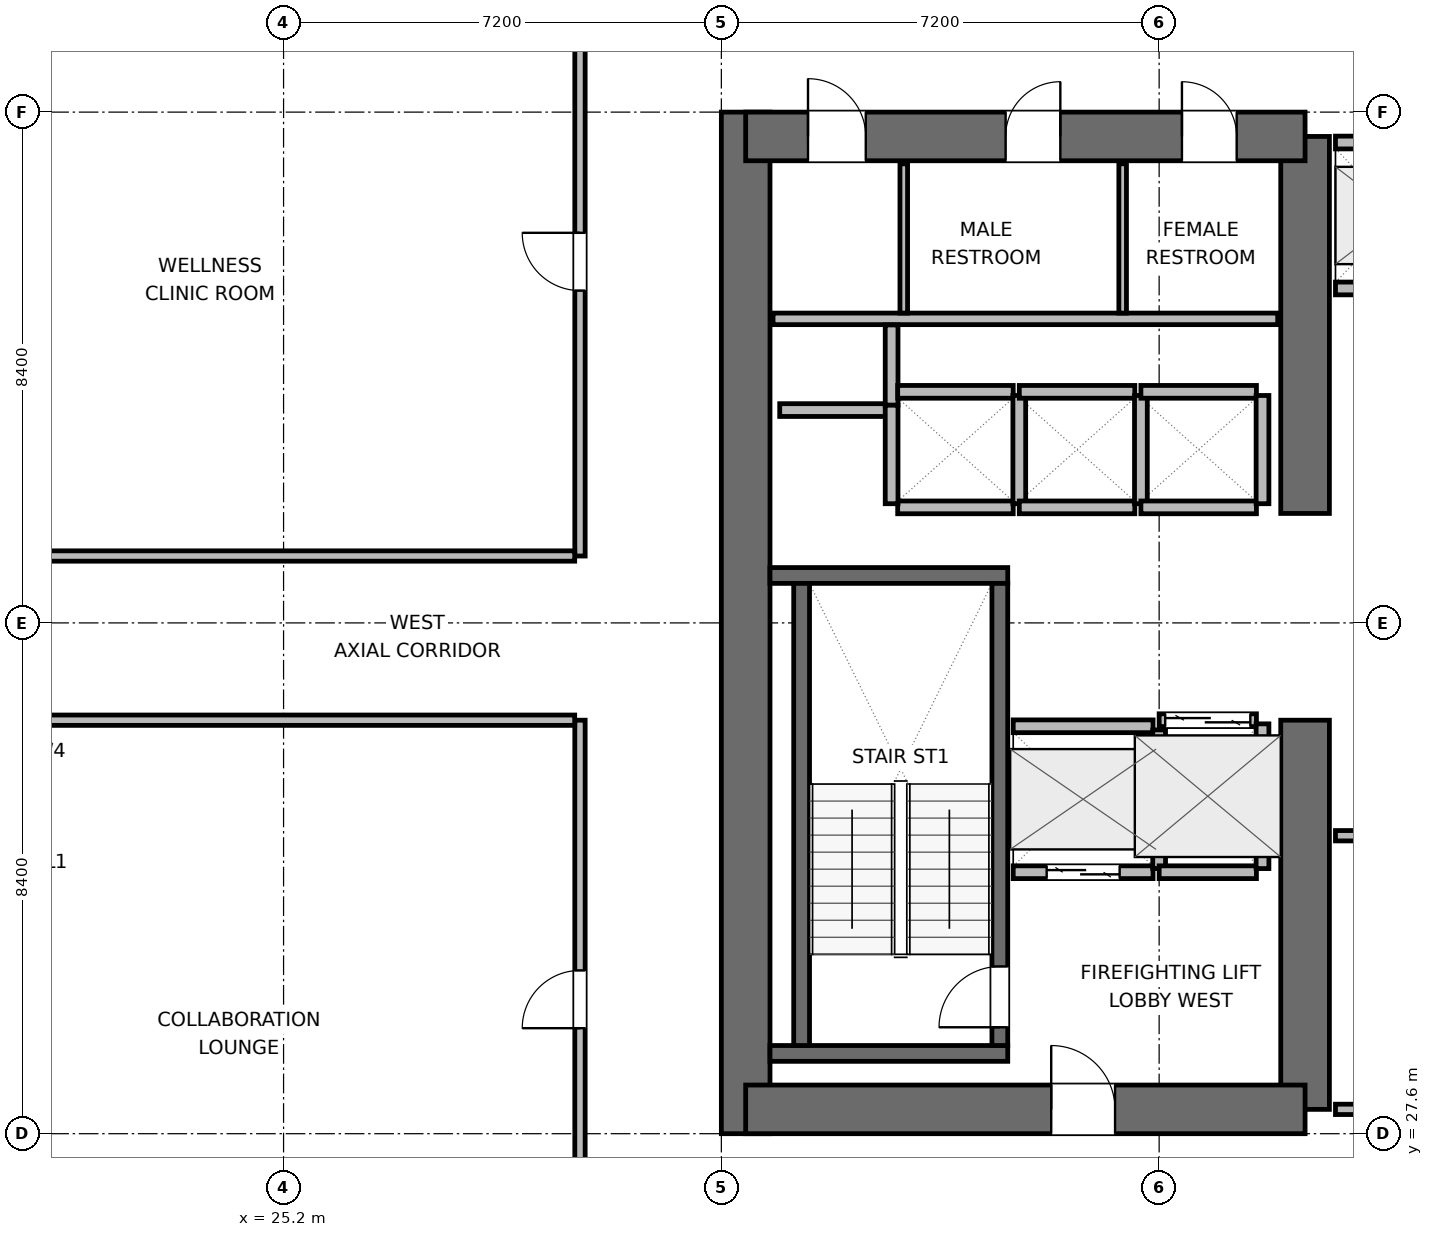
"""IFC4 building model, lengths in metres.
Left out: names, types, materials, properties, quantities, classifications, styles, units other than length and angle.
Written with IfcOpenShell. Run it as: python <this file> out.ifc"""

import sys

from ifc_helpers import new_model, si_unit, direction, frame, frame_2d, origin, place, context, subcontext, project, spatial, rectangle, extrude, element, fill, save


model = new_model("IFC4")
c1 = context("Model", 3, precision=1e-05, world=origin(), true_north=direction((0.0, 1.0)))
c2 = subcontext(c1, "Body", "Model", "MODEL_VIEW")
j1 = project(units=[si_unit("LENGTHUNIT", "METRE"), si_unit("PLANEANGLEUNIT", "RADIAN")], contexts=[c1])
p1 = place(None, origin())
s1 = spatial("IfcSite", under=j1, at=p1, CompositionType="ELEMENT")
p2 = place(p1, origin())
s2 = spatial("IfcBuilding", under=s1, at=p2, CompositionType="ELEMENT")
p3 = place(p2, frame((0.0, 0.0, 158.4)))
s3 = spatial("IfcBuildingStorey", under=s2, at=p3, CompositionType="ELEMENT", Elevation=158.4)
p4 = place(p3, frame((32.8, 27.6, 0.0), z_axis=(0.0, 0.0, 1.0), x_axis=(0.0, 1.0, 0.0)))
e1 = element("IfcWall", 1, at=p4, inside=s3, PredefinedType="SHEAR", context=c2, shape_type="SweptSolid", body=[
    extrude(rectangle(XDim=16.8, YDim=0.8, at=frame_2d((8.4, 0.0))), origin(), (0.0, 0.0, 1.0), 3.9),
])
p5 = place(p3, frame((42.0, 28.0, 0.0), z_axis=(0.0, 0.0, 1.0), x_axis=(0.0, 1.0, 0.0)))
e2 = element("IfcWall", 2, at=p5, inside=s3, PredefinedType="SHEAR", context=c2, shape_type="SweptSolid", body=[
    extrude(rectangle(XDim=6.4, YDim=0.8, at=frame_2d((3.2, 0.0))), origin(), (0.0, 0.0, 1.0), 3.9),
])
p6 = place(p3, frame((42.0, 37.8, 0.0), z_axis=(0.0, 0.0, 1.0), x_axis=(0.0, 1.0, 0.0)))
e3 = element("IfcWall", 3, at=p6, inside=s3, PredefinedType="SHEAR", context=c2, shape_type="SweptSolid", body=[
    extrude(rectangle(XDim=6.2, YDim=0.8, at=frame_2d((3.1, 0.0))), origin(), (0.0, 0.0, 1.0), 3.9),
])
p7 = place(p3, frame((32.8, 28.0, 0.0), z_axis=(0.0, 0.0, 1.0), x_axis=(1.0, 0.0, 0.0)))
e4 = element("IfcWall", 4, at=p7, inside=s3, PredefinedType="SHEAR", context=c2, shape_type="SweptSolid", body=[
    extrude(rectangle(XDim=9.2, YDim=0.8, at=frame_2d((4.6, 0.0))), origin(), (0.0, 0.0, 1.0), 3.9),
])
p8 = place(p7, frame((5.025, 0.0, 0.0)))
e5 = element("IfcOpeningElement", 5, at=p8, cuts=e4, PredefinedType="OPENING", context=c2, shape_type="SweptSolid", body=[
    extrude(rectangle(XDim=1.05, YDim=2.04, at=frame_2d((0.525, 1.02))), frame((0.0, 0.41, 0.0), z_axis=(0.0, -1.0, 0.0), x_axis=(1.0, 0.0, 0.0)), (0.0, 0.0, 1.0), 0.82),
])
p9 = place(p3, frame((32.8, 44.0, 0.0), z_axis=(0.0, 0.0, 1.0), x_axis=(1.0, 0.0, 0.0)))
e6 = element("IfcWall", 6, at=p9, inside=s3, PredefinedType="SHEAR", context=c2, shape_type="SweptSolid", body=[
    extrude(rectangle(XDim=9.2, YDim=0.8, at=frame_2d((4.6, 0.0))), origin(), (0.0, 0.0, 1.0), 3.9),
])
p10 = place(p9, frame((1.025, 0.0, 0.0)))
e7 = element("IfcOpeningElement", 7, at=p10, cuts=e6, PredefinedType="OPENING", context=c2, shape_type="SweptSolid", body=[
    extrude(rectangle(XDim=0.95, YDim=2.04, at=frame_2d((0.475, 1.02))), frame((0.0, 0.41, 0.0), z_axis=(0.0, -1.0, 0.0), x_axis=(1.0, 0.0, 0.0)), (0.0, 0.0, 1.0), 0.82),
])
p11 = place(p9, frame((4.275, 0.0, 0.0)))
e8 = element("IfcOpeningElement", 8, at=p11, cuts=e6, PredefinedType="OPENING", context=c2, shape_type="SweptSolid", body=[
    extrude(rectangle(XDim=0.9, YDim=2.02, at=frame_2d((0.45, 1.01))), frame((0.0, 0.41, 0.0), z_axis=(0.0, -1.0, 0.0), x_axis=(1.0, 0.0, 0.0)), (0.0, 0.0, 1.0), 0.82),
])
p12 = place(p9, frame((7.175, 0.0, 0.0)))
e9 = element("IfcOpeningElement", 9, at=p12, cuts=e6, PredefinedType="OPENING", context=c2, shape_type="SweptSolid", body=[
    extrude(rectangle(XDim=0.9, YDim=2.02, at=frame_2d((0.45, 1.01))), frame((0.0, 0.41, 0.0), z_axis=(0.0, -1.0, 0.0), x_axis=(1.0, 0.0, 0.0)), (0.0, 0.0, 1.0), 0.82),
])
for number, where, z_axis, x_axis in (
    (10, (33.2, 28.92, 0.0), (0.0, 0.0, 1.0), (1.0, 0.0, 0.0)),
    (11, (33.2, 36.78, 0.0), (0.0, 0.0, 1.0), (1.0, 0.0, 0.0)),
):
    element("IfcWall", number, at=place(p3, frame(where, z_axis=z_axis, x_axis=x_axis)), inside=s3, PredefinedType="SHEAR", context=c2, shape_type="SweptSolid", body=[
        extrude(rectangle(XDim=3.91, YDim=0.26, at=frame_2d((1.955, 0.0))), origin(), (0.0, 0.0, 1.0), 3.9),
    ])
p13 = place(p3, frame((33.72, 29.05, 0.0), z_axis=(0.0, 0.0, 1.0), x_axis=(0.0, 1.0, 0.0)))
e12 = element("IfcWall", 12, at=p13, inside=s3, PredefinedType="SHEAR", context=c2, shape_type="SweptSolid", body=[
    extrude(rectangle(XDim=7.6, YDim=0.26, at=frame_2d((3.8, 0.0))), origin(), (0.0, 0.0, 1.0), 3.9),
])
p14 = place(p3, frame((36.98, 29.05, 0.0), z_axis=(0.0, 0.0, 1.0), x_axis=(0.0, 1.0, 0.0)))
e13 = element("IfcWall", 13, at=p14, inside=s3, PredefinedType="SHEAR", context=c2, shape_type="SweptSolid", body=[
    extrude(rectangle(XDim=7.6, YDim=0.26, at=frame_2d((3.8, 0.0))), origin(), (0.0, 0.0, 1.0), 3.9),
])
p15 = place(p14, frame((0.3, 0.0, 0.0)))
e14 = element("IfcOpeningElement", 14, at=p15, cuts=e13, PredefinedType="OPENING", context=c2, shape_type="SweptSolid", body=[
    extrude(rectangle(XDim=1.0, YDim=2.04, at=frame_2d((0.5, 1.02))), frame((0.0, 0.14, 0.0), z_axis=(0.0, -1.0, 0.0), x_axis=(1.0, 0.0, 0.0)), (0.0, 0.0, 1.0), 0.28),
])
p16 = place(p3, frame((33.25, 41.0, 0.0), z_axis=(0.0, 0.0, 1.0), x_axis=(1.0, 0.0, 0.0)))
e15 = element("IfcWall", 15, at=p16, inside=s3, PredefinedType="PLUMBINGWALL", context=c2, shape_type="SweptSolid", body=[
    extrude(rectangle(XDim=8.3, YDim=0.19, at=frame_2d((4.15, 0.0))), origin(), (0.0, 0.0, 1.0), 3.68),
])
for number, where, z_axis, x_axis in (
    (16, (35.4, 41.095, 0.0), (0.0, 0.0, 1.0), (0.0, 1.0, 0.0)),
    (17, (39.0, 41.095, 0.0), (0.0, 0.0, 1.0), (0.0, 1.0, 0.0)),
):
    element("IfcWall", number, at=place(p3, frame(where, z_axis=z_axis, x_axis=x_axis)), inside=s3, PredefinedType="PARTITIONING", context=c2, shape_type="SweptSolid", body=[
        extrude(rectangle(XDim=2.455, YDim=0.125, at=frame_2d((1.228, 0.0))), origin(), (0.0, 0.0, 1.0), 3.68),
    ])
p17 = place(p3, frame((33.36, 39.5, 0.0), z_axis=(0.0, 0.0, 1.0), x_axis=(1.0, 0.0, 0.0)))
e18 = element("IfcWall", 18, at=p17, inside=s3, PredefinedType="PARTITIONING", context=c2, shape_type="SweptSolid", body=[
    extrude(rectangle(XDim=1.86, YDim=0.21, at=frame_2d((0.93, 0.0))), origin(), (0.0, 0.0, 1.0), 3.68),
])
p18 = place(p3, frame((35.2, 39.58, 0.0), z_axis=(0.0, 0.0, 1.0), x_axis=(0.0, 1.0, 0.0)))
e19 = element("IfcWall", 19, at=p18, inside=s3, PredefinedType="PARTITIONING", context=c2, shape_type="SweptSolid", body=[
    extrude(rectangle(XDim=1.32, YDim=0.21, at=frame_2d((0.66, 0.0))), origin(), (0.0, 0.0, 1.0), 3.68),
])
p19 = place(p3, frame((37.2, 31.9, 0.0), z_axis=(0.0, 0.0, 1.0), x_axis=(1.0, 0.0, 0.0)))
e20 = element("IfcWall", 20, at=p19, inside=s3, PredefinedType="PARTITIONING", context=c2, shape_type="SweptSolid", body=[
    extrude(rectangle(XDim=2.3, YDim=0.21, at=frame_2d((1.15, 0.0))), origin(), (0.0, 0.0, 1.0), 3.68),
])
p20 = place(p19, frame((0.55, 0.0, 0.0)))
e21 = element("IfcOpeningElement", 21, at=p20, cuts=e20, PredefinedType="OPENING", context=c2, shape_type="SweptSolid", body=[
    extrude(rectangle(XDim=1.2, YDim=2.04, at=frame_2d((0.6, 1.02))), frame((0.0, 0.115, 0.0), z_axis=(0.0, -1.0, 0.0), x_axis=(1.0, 0.0, 0.0)), (0.0, 0.0, 1.0), 0.23),
])
p21 = place(p3, frame((37.2, 34.3, 0.0), z_axis=(0.0, 0.0, 1.0), x_axis=(1.0, 0.0, 0.0)))
e22 = element("IfcWall", 22, at=p21, inside=s3, PredefinedType="PARTITIONING", context=c2, shape_type="SweptSolid", body=[
    extrude(rectangle(XDim=2.3, YDim=0.21, at=frame_2d((1.15, 0.0))), origin(), (0.0, 0.0, 1.0), 3.68),
])
p22 = place(p3, frame((39.6, 31.96, 0.0), z_axis=(0.0, 0.0, 1.0), x_axis=(0.0, 1.0, 0.0)))
e23 = element("IfcWall", 23, at=p22, inside=s3, PredefinedType="PARTITIONING", context=c2, shape_type="SweptSolid", body=[
    extrude(rectangle(XDim=2.28, YDim=0.21, at=frame_2d((1.14, 0.0))), origin(), (0.0, 0.0, 1.0), 3.68),
])
p23 = place(p3, frame((39.6, 34.4, 0.0), z_axis=(0.0, 0.0, 1.0), x_axis=(1.0, 0.0, 0.0)))
e24 = element("IfcWall", 24, at=p23, inside=s3, PredefinedType="PARTITIONING", context=c2, shape_type="SweptSolid", body=[
    extrude(rectangle(XDim=1.6, YDim=0.21, at=frame_2d((0.8, 0.0))), origin(), (0.0, 0.0, 1.0), 3.68),
])
p24 = place(p23, frame((0.1, 0.0, 0.0)))
e25 = element("IfcOpeningElement", 25, at=p24, cuts=e24, PredefinedType="OPENING", context=c2, shape_type="SweptSolid", body=[
    extrude(rectangle(XDim=1.4, YDim=2.06, at=frame_2d((0.7, 1.03))), frame((0.0, 0.115, 0.0), z_axis=(0.0, -1.0, 0.0), x_axis=(1.0, 0.0, 0.0)), (0.0, 0.0, 1.0), 0.23),
])
p25 = place(p3, frame((39.6, 31.9, 0.0), z_axis=(0.0, 0.0, 1.0), x_axis=(1.0, 0.0, 0.0)))
e26 = element("IfcWall", 26, at=p25, inside=s3, PredefinedType="PARTITIONING", context=c2, shape_type="SweptSolid", body=[
    extrude(rectangle(XDim=1.6, YDim=0.21, at=frame_2d((0.8, 0.0))), origin(), (0.0, 0.0, 1.0), 3.68),
])
p26 = place(p3, frame((41.3, 31.96, 0.0), z_axis=(0.0, 0.0, 1.0), x_axis=(0.0, 1.0, 0.0)))
e27 = element("IfcWall", 27, at=p26, inside=s3, PredefinedType="PARTITIONING", context=c2, shape_type="SweptSolid", body=[
    extrude(rectangle(XDim=2.38, YDim=0.21, at=frame_2d((1.19, 0.0))), origin(), (0.0, 0.0, 1.0), 3.68),
])
p27 = place(p3, frame((42.5, 41.5, 0.0), z_axis=(0.0, 0.0, 1.0), x_axis=(1.0, 0.0, 0.0)))
e28 = element("IfcWall", 28, at=p27, inside=s3, PredefinedType="PARTITIONING", context=c2, shape_type="SweptSolid", body=[
    extrude(rectangle(XDim=2.1, YDim=0.21, at=frame_2d((1.05, 0.0))), origin(), (0.0, 0.0, 1.0), 3.68),
])
p28 = place(p27, frame((0.5, 0.0, 0.0)))
e29 = element("IfcOpeningElement", 29, at=p28, cuts=e28, PredefinedType="OPENING", context=c2, shape_type="SweptSolid", body=[
    extrude(rectangle(XDim=1.1, YDim=2.04, at=frame_2d((0.55, 1.02))), frame((0.0, 0.115, 0.0), z_axis=(0.0, -1.0, 0.0), x_axis=(1.0, 0.0, 0.0)), (0.0, 0.0, 1.0), 0.23),
])
p29 = place(p3, frame((42.5, 43.9, 0.0), z_axis=(0.0, 0.0, 1.0), x_axis=(1.0, 0.0, 0.0)))
e30 = element("IfcWall", 30, at=p29, inside=s3, PredefinedType="PARTITIONING", context=c2, shape_type="SweptSolid", body=[
    extrude(rectangle(XDim=2.1, YDim=0.21, at=frame_2d((1.05, 0.0))), origin(), (0.0, 0.0, 1.0), 2.565),
])
for number, where, z_axis, x_axis in (
    (31, (35.3, 37.9, 0.0), (0.0, 0.0, 1.0), (1.0, 0.0, 0.0)),
    (32, (35.3, 39.8, 0.0), (0.0, 0.0, 1.0), (1.0, 0.0, 0.0)),
):
    element("IfcWall", number, at=place(p3, frame(where, z_axis=z_axis, x_axis=x_axis)), inside=s3, PredefinedType="PARTITIONING", context=c2, shape_type="SweptSolid", body=[
        extrude(rectangle(XDim=1.9, YDim=0.21, at=frame_2d((0.95, 0.0))), origin(), (0.0, 0.0, 1.0), 3.68),
    ])
p30 = place(p3, frame((35.2, 37.96, 0.0), z_axis=(0.0, 0.0, 1.0), x_axis=(0.0, 1.0, 0.0)))
e33 = element("IfcWall", 33, at=p30, inside=s3, PredefinedType="PARTITIONING", context=c2, shape_type="SweptSolid", body=[
    extrude(rectangle(XDim=1.62, YDim=0.21, at=frame_2d((0.81, 0.0))), origin(), (0.0, 0.0, 1.0), 3.68),
])
p31 = place(p3, frame((37.3, 37.96, 0.0), z_axis=(0.0, 0.0, 1.0), x_axis=(0.0, 1.0, 0.0)))
e34 = element("IfcWall", 34, at=p31, inside=s3, PredefinedType="PARTITIONING", context=c2, shape_type="SweptSolid", body=[
    extrude(rectangle(XDim=1.78, YDim=0.21, at=frame_2d((0.89, 0.0))), origin(), (0.0, 0.0, 1.0), 3.68),
])
for number, where, z_axis, x_axis in (
    (35, (37.3, 37.9, 0.0), (0.0, 0.0, 1.0), (1.0, 0.0, 0.0)),
    (36, (37.3, 39.8, 0.0), (0.0, 0.0, 1.0), (1.0, 0.0, 0.0)),
):
    element("IfcWall", number, at=place(p3, frame(where, z_axis=z_axis, x_axis=x_axis)), inside=s3, PredefinedType="PARTITIONING", context=c2, shape_type="SweptSolid", body=[
        extrude(rectangle(XDim=1.9, YDim=0.21, at=frame_2d((0.95, 0.0))), origin(), (0.0, 0.0, 1.0), 3.68),
    ])
p32 = place(p3, frame((39.3, 37.96, 0.0), z_axis=(0.0, 0.0, 1.0), x_axis=(0.0, 1.0, 0.0)))
e37 = element("IfcWall", 37, at=p32, inside=s3, PredefinedType="PARTITIONING", context=c2, shape_type="SweptSolid", body=[
    extrude(rectangle(XDim=1.78, YDim=0.21, at=frame_2d((0.89, 0.0))), origin(), (0.0, 0.0, 1.0), 3.68),
])
for number, where, z_axis, x_axis in (
    (38, (39.3, 37.9, 0.0), (0.0, 0.0, 1.0), (1.0, 0.0, 0.0)),
    (39, (39.3, 39.8, 0.0), (0.0, 0.0, 1.0), (1.0, 0.0, 0.0)),
):
    element("IfcWall", number, at=place(p3, frame(where, z_axis=z_axis, x_axis=x_axis)), inside=s3, PredefinedType="PARTITIONING", context=c2, shape_type="SweptSolid", body=[
        extrude(rectangle(XDim=1.9, YDim=0.21, at=frame_2d((0.95, 0.0))), origin(), (0.0, 0.0, 1.0), 3.68),
    ])
p33 = place(p3, frame((41.3, 37.96, 0.0), z_axis=(0.0, 0.0, 1.0), x_axis=(0.0, 1.0, 0.0)))
e40 = element("IfcWall", 40, at=p33, inside=s3, PredefinedType="PARTITIONING", context=c2, shape_type="SweptSolid", body=[
    extrude(rectangle(XDim=1.78, YDim=0.21, at=frame_2d((0.89, 0.0))), origin(), (0.0, 0.0, 1.0), 3.68),
])
p34 = place(p3, frame((42.5, 28.0, 0.0), z_axis=(0.0, 0.0, 1.0), x_axis=(1.0, 0.0, 0.0)))
e41 = element("IfcWall", 41, at=p34, inside=s3, PredefinedType="PARTITIONING", context=c2, shape_type="SweptSolid", body=[
    extrude(rectangle(XDim=4.213, YDim=0.17, at=frame_2d((2.106, 0.0))), origin(), (0.0, 0.0, 1.0), 2.565),
])
p35 = place(p3, frame((42.5, 32.5, 0.0), z_axis=(0.0, 0.0, 1.0), x_axis=(1.0, 0.0, 0.0)))
e42 = element("IfcWall", 42, at=p35, inside=s3, PredefinedType="PARTITIONING", context=c2, shape_type="SweptSolid", body=[
    extrude(rectangle(XDim=1.3, YDim=0.17, at=frame_2d((0.65, 0.0))), origin(), (0.0, 0.0, 1.0), 3.68),
])
p36 = place(p3, frame((30.075, 25.307, 0.0), z_axis=(0.0, 0.0, 1.0), x_axis=(0.0, 1.0, 0.0)))
e43 = element("IfcWall", 43, at=p36, inside=s3, PredefinedType="PARTITIONING", context=c2, shape_type="SweptSolid", body=[
    extrude(rectangle(XDim=9.093, YDim=0.17, at=frame_2d((4.546, 0.0))), origin(), (0.0, 0.0, 1.0), 3.68),
])
p37 = place(p36, frame((4.028, 0.0, 0.0)))
e44 = element("IfcOpeningElement", 44, at=p37, cuts=e43, PredefinedType="OPENING", context=c2, shape_type="SweptSolid", body=[
    extrude(rectangle(XDim=0.95, YDim=2.04, at=frame_2d((0.475, 1.02))), frame((0.0, 0.095, 0.0), z_axis=(0.0, -1.0, 0.0), x_axis=(1.0, 0.0, 0.0)), (0.0, 0.0, 1.0), 0.19),
])
p38 = place(p3, frame((30.075, 37.1, 0.0), z_axis=(0.0, 0.0, 1.0), x_axis=(0.0, 1.0, 0.0)))
e45 = element("IfcWall", 45, at=p38, inside=s3, PredefinedType="PARTITIONING", context=c2, shape_type="SweptSolid", body=[
    extrude(rectangle(XDim=9.593, YDim=0.17, at=frame_2d((4.796, 0.0))), origin(), (0.0, 0.0, 1.0), 3.68),
])
p39 = place(p38, frame((4.365, 0.0, 0.0)))
e46 = element("IfcOpeningElement", 46, at=p39, cuts=e45, PredefinedType="OPENING", context=c2, shape_type="SweptSolid", body=[
    extrude(rectangle(XDim=0.95, YDim=2.04, at=frame_2d((0.475, 1.02))), frame((0.0, 0.095, 0.0), z_axis=(0.0, -1.0, 0.0), x_axis=(1.0, 0.0, 0.0)), (0.0, 0.0, 1.0), 0.19),
])
p40 = place(p3, frame((20.24, 34.4, 0.0), z_axis=(0.0, 0.0, 1.0), x_axis=(1.0, 0.0, 0.0)))
e47 = element("IfcWall", 47, at=p40, inside=s3, PredefinedType="PARTITIONING", context=c2, shape_type="SweptSolid", body=[
    extrude(rectangle(XDim=9.748, YDim=0.17, at=frame_2d((4.874, 0.0))), origin(), (0.0, 0.0, 1.0), 3.68),
])
p41 = place(p3, frame((18.225, 37.1, 0.0), z_axis=(0.0, 0.0, 1.0), x_axis=(1.0, 0.0, 0.0)))
e48 = element("IfcWall", 48, at=p41, inside=s3, PredefinedType="PARTITIONING", context=c2, shape_type="SweptSolid", body=[
    extrude(rectangle(XDim=11.763, YDim=0.17, at=frame_2d((5.881, 0.0))), origin(), (0.0, 0.0, 1.0), 3.68),
])
p42 = place(p15, origin())
e49 = element("IfcDoor", 49, at=p42, inside=s3, OperationType="SINGLE_SWING_LEFT", PredefinedType="DOOR", context=c2, shape_type="SweptSolid", body=[
    extrude(rectangle(XDim=1.0, YDim=2.04, at=frame_2d((0.5, 1.02))), frame((0.0, 0.025, 0.0), z_axis=(0.0, -1.0, 0.0), x_axis=(1.0, 0.0, 0.0)), (0.0, 0.0, 1.0), 0.05),
])
fill(e14, e49)
p43 = place(p20, origin())
e50 = element("IfcDoor", 50, at=p43, inside=s3, OperationType="DOUBLE_DOOR_SLIDING", PredefinedType="DOOR", context=c2, shape_type="SweptSolid", body=[
    extrude(rectangle(XDim=1.2, YDim=2.04, at=frame_2d((0.6, 1.02))), frame((0.0, 0.025, 0.0), z_axis=(0.0, -1.0, 0.0), x_axis=(1.0, 0.0, 0.0)), (0.0, 0.0, 1.0), 0.05),
])
fill(e21, e50)
p44 = place(p24, origin())
e51 = element("IfcDoor", 51, at=p44, inside=s3, OperationType="DOUBLE_DOOR_SLIDING", PredefinedType="DOOR", context=c2, shape_type="SweptSolid", body=[
    extrude(rectangle(XDim=1.4, YDim=2.06, at=frame_2d((0.7, 1.03))), frame((0.0, 0.025, 0.0), z_axis=(0.0, -1.0, 0.0), x_axis=(1.0, 0.0, 0.0)), (0.0, 0.0, 1.0), 0.05),
])
fill(e25, e51)
p45 = place(p8, origin())
e52 = element("IfcDoor", 52, at=p45, inside=s3, OperationType="SINGLE_SWING_LEFT", PredefinedType="DOOR", context=c2, shape_type="SweptSolid", body=[
    extrude(rectangle(XDim=1.05, YDim=2.04, at=frame_2d((0.525, 1.02))), frame((0.0, 0.025, 0.0), z_axis=(0.0, -1.0, 0.0), x_axis=(1.0, 0.0, 0.0)), (0.0, 0.0, 1.0), 0.05),
])
fill(e5, e52)
p46 = place(p10, origin())
e53 = element("IfcDoor", 53, at=p46, inside=s3, OperationType="SINGLE_SWING_LEFT", PredefinedType="DOOR", context=c2, shape_type="SweptSolid", body=[
    extrude(rectangle(XDim=0.95, YDim=2.04, at=frame_2d((0.475, 1.02))), frame((0.0, 0.025, 0.0), z_axis=(0.0, -1.0, 0.0), x_axis=(1.0, 0.0, 0.0)), (0.0, 0.0, 1.0), 0.05),
])
fill(e7, e53)
p47 = place(p11, origin())
e54 = element("IfcDoor", 54, at=p47, inside=s3, OperationType="SINGLE_SWING_RIGHT", PredefinedType="DOOR", context=c2, shape_type="SweptSolid", body=[
    extrude(rectangle(XDim=0.9, YDim=2.02, at=frame_2d((0.45, 1.01))), frame((0.0, 0.025, 0.0), z_axis=(0.0, -1.0, 0.0), x_axis=(1.0, 0.0, 0.0)), (0.0, 0.0, 1.0), 0.05),
])
fill(e8, e54)
p48 = place(p12, origin())
e55 = element("IfcDoor", 55, at=p48, inside=s3, OperationType="SINGLE_SWING_LEFT", PredefinedType="DOOR", context=c2, shape_type="SweptSolid", body=[
    extrude(rectangle(XDim=0.9, YDim=2.02, at=frame_2d((0.45, 1.01))), frame((0.0, 0.025, 0.0), z_axis=(0.0, -1.0, 0.0), x_axis=(1.0, 0.0, 0.0)), (0.0, 0.0, 1.0), 0.05),
])
fill(e9, e55)
p49 = place(p37, origin())
e56 = element("IfcDoor", 56, at=p49, inside=s3, OperationType="SINGLE_SWING_LEFT", PredefinedType="DOOR", context=c2, shape_type="SweptSolid", body=[
    extrude(rectangle(XDim=0.95, YDim=2.04, at=frame_2d((0.475, 1.02))), frame((0.0, 0.025, 0.0), z_axis=(0.0, -1.0, 0.0), x_axis=(1.0, 0.0, 0.0)), (0.0, 0.0, 1.0), 0.05),
])
fill(e44, e56)
p50 = place(p39, origin())
e57 = element("IfcDoor", 57, at=p50, inside=s3, OperationType="SINGLE_SWING_RIGHT", PredefinedType="DOOR", context=c2, shape_type="SweptSolid", body=[
    extrude(rectangle(XDim=0.95, YDim=2.04, at=frame_2d((0.475, 1.02))), frame((0.0, 0.025, 0.0), z_axis=(0.0, -1.0, 0.0), x_axis=(1.0, 0.0, 0.0)), (0.0, 0.0, 1.0), 0.05),
])
fill(e46, e57)
save(model, sys.argv[1])
